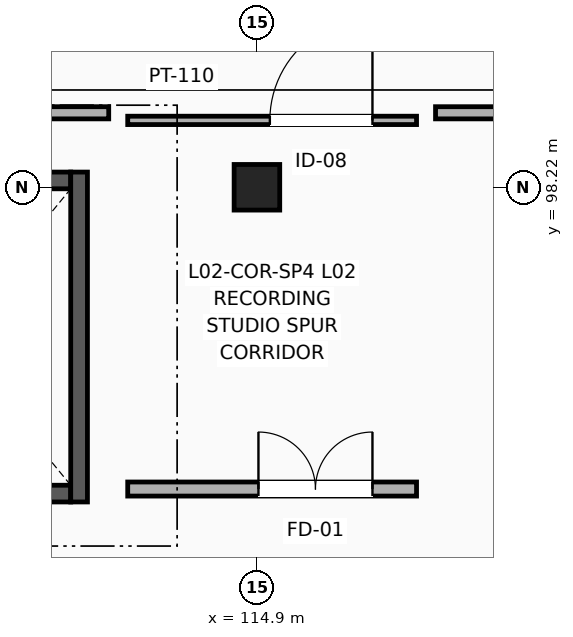
"""IFC4 building model, lengths in metres.
Left out: names, types, materials, properties, quantities, classifications, styles, units other than length and angle.
Written with IfcOpenShell. Run it as: python <this file> out.ifc"""

import sys

from ifc_helpers import new_model, si_unit, direction, frame, frame_2d, origin, origin_2d, place, context, subcontext, project, spatial, rectangle, extrude, element, fill, save


model = new_model("IFC4")
c1 = context("Model", 3, precision=1e-05, world=origin(), true_north=direction((0.0, 1.0)))
c2 = subcontext(c1, "Body", "Model", "MODEL_VIEW")
j1 = project(units=[si_unit("LENGTHUNIT", "METRE"), si_unit("PLANEANGLEUNIT", "RADIAN")], contexts=[c1])
p1 = place(None, origin())
s1 = spatial("IfcSite", under=j1, at=p1, CompositionType="ELEMENT")
p2 = place(p1, origin())
s2 = spatial("IfcBuilding", under=s1, at=p2, CompositionType="ELEMENT")
p3 = place(p2, frame((0.0, 0.0, 10.2)))
s3 = spatial("IfcBuildingStorey", under=s2, at=p3, CompositionType="ELEMENT", Elevation=10.2)
p4 = place(p3, frame((114.9, 98.22, 0.0), z_axis=(0.0, 0.0, 1.0), x_axis=(1.0, 0.0, 0.0)))
e1 = element("IfcColumn", 1, at=p4, inside=s3, PredefinedType="COLUMN", context=c2, shape_type="SweptSolid", body=[
    extrude(rectangle(XDim=0.6, YDim=0.6, at=origin_2d()), origin(), (0.0, 0.0, 1.0), 4.5),
])
p5 = place(p3, frame((109.25, 94.19, 0.0), z_axis=(0.0, 0.0, 1.0), x_axis=(1.0, 0.0, 0.0)))
e2 = element("IfcWall", 2, at=p5, inside=s3, PredefinedType="SOLIDWALL", context=c2, shape_type="SweptSolid", body=[
    extrude(rectangle(XDim=3.2, YDim=0.22, at=frame_2d((1.6, 0.0))), origin(), (0.0, 0.0, 1.0), 4.225),
])
p6 = place(p5, frame((0.5, 0.0, 0.0)))
e3 = element("IfcOpeningElement", 3, at=p6, cuts=e2, PredefinedType="OPENING", context=c2, shape_type="SweptSolid", body=[
    extrude(rectangle(XDim=2.2, YDim=2.6, at=frame_2d((1.1, 1.3))), frame((0.0, 0.12, 0.0), z_axis=(0.0, -1.0, 0.0), x_axis=(1.0, 0.0, 0.0)), (0.0, 0.0, 1.0), 0.24),
])
p7 = place(p3, frame((109.25, 98.31, 0.0), z_axis=(0.0, 0.0, 1.0), x_axis=(1.0, 0.0, 0.0)))
e4 = element("IfcWall", 4, at=p7, inside=s3, PredefinedType="SOLIDWALL", context=c2, shape_type="SweptSolid", body=[
    extrude(rectangle(XDim=3.2, YDim=0.22, at=frame_2d((1.6, 0.0))), origin(), (0.0, 0.0, 1.0), 3.707),
])
p8 = place(p3, frame((112.56, 94.08, 0.0), z_axis=(0.0, 0.0, 1.0), x_axis=(0.0, 1.0, 0.0)))
e5 = element("IfcWall", 5, at=p8, inside=s3, PredefinedType="SOLIDWALL", context=c2, shape_type="SweptSolid", body=[
    extrude(rectangle(XDim=4.34, YDim=0.22, at=frame_2d((2.17, 0.0))), origin(), (0.0, 0.0, 1.0), 3.707),
])
p9 = place(p3, frame((113.2, 94.25, 0.0), z_axis=(0.0, 0.0, 1.0), x_axis=(1.0, 0.0, 0.0)))
e6 = element("IfcWall", 6, at=p9, inside=s3, PredefinedType="PARTITIONING", context=c2, shape_type="SweptSolid", body=[
    extrude(rectangle(XDim=3.8, YDim=0.185, at=frame_2d((1.9, 0.0))), origin(), (0.0, 0.0, 1.0), 3.557),
])
p10 = place(p9, frame((1.72, 0.0, 0.0)))
e7 = element("IfcOpeningElement", 7, at=p10, cuts=e6, PredefinedType="OPENING", context=c2, shape_type="SweptSolid", body=[
    extrude(rectangle(XDim=1.5, YDim=2.2, at=frame_2d((0.75, 1.1))), frame((0.0, 0.103, 0.0), z_axis=(0.0, -1.0, 0.0), x_axis=(1.0, 0.0, 0.0)), (0.0, 0.0, 1.0), 0.205),
])
p11 = place(p3, frame((113.2, 99.1, 0.0), z_axis=(0.0, 0.0, 1.0), x_axis=(1.0, 0.0, 0.0)))
e8 = element("IfcWall", 8, at=p11, inside=s3, PredefinedType="PARTITIONING", context=c2, shape_type="SweptSolid", body=[
    extrude(rectangle(XDim=3.8, YDim=0.11, at=frame_2d((1.9, 0.0))), origin(), (0.0, 0.0, 1.0), 3.607),
])
p12 = place(p11, frame((1.87, 0.0, 0.0)))
e9 = element("IfcOpeningElement", 9, at=p12, cuts=e8, PredefinedType="OPENING", context=c2, shape_type="SweptSolid", body=[
    extrude(rectangle(XDim=1.35, YDim=2.2, at=frame_2d((0.675, 1.1))), frame((0.0, 0.065, 0.0), z_axis=(0.0, -1.0, 0.0), x_axis=(1.0, 0.0, 0.0)), (0.0, 0.0, 1.0), 0.13),
])
p13 = place(p3, frame((99.1, 99.2, 0.0), z_axis=(0.0, 0.0, 1.0), x_axis=(1.0, 0.0, 0.0)))
e10 = element("IfcWall", 10, at=p13, inside=s3, PredefinedType="PARTITIONING", context=c2, shape_type="SweptSolid", body=[
    extrude(rectangle(XDim=13.85, YDim=0.16, at=frame_2d((6.925, 0.0))), origin(), (0.0, 0.0, 1.0), 3.897),
])
p14 = place(p3, frame((117.25, 99.2, 0.0), z_axis=(0.0, 0.0, 1.0), x_axis=(1.0, 0.0, 0.0)))
e11 = element("IfcWall", 11, at=p14, inside=s3, PredefinedType="PARTITIONING", context=c2, shape_type="SweptSolid", body=[
    extrude(rectangle(XDim=13.45, YDim=0.16, at=frame_2d((6.725, 0.0))), origin(), (0.0, 0.0, 1.0), 3.807),
])
p15 = place(p10, origin())
e12 = element("IfcDoor", 12, at=p15, inside=s3, OperationType="DOUBLE_DOOR_SINGLE_SWING", PredefinedType="DOOR", context=c2, shape_type="SweptSolid", body=[
    extrude(rectangle(XDim=1.5, YDim=2.2, at=frame_2d((0.75, 1.1))), frame((0.0, 0.025, 0.0), z_axis=(0.0, -1.0, 0.0), x_axis=(1.0, 0.0, 0.0)), (0.0, 0.0, 1.0), 0.05),
])
fill(e7, e12)
p16 = place(p12, origin())
e13 = element("IfcDoor", 13, at=p16, inside=s3, OperationType="SINGLE_SWING_RIGHT", PredefinedType="DOOR", context=c2, shape_type="SweptSolid", body=[
    extrude(rectangle(XDim=1.35, YDim=2.2, at=frame_2d((0.675, 1.1))), frame((0.0, 0.025, 0.0), z_axis=(0.0, -1.0, 0.0), x_axis=(1.0, 0.0, 0.0)), (0.0, 0.0, 1.0), 0.05),
])
fill(e9, e13)
save(model, sys.argv[1])
